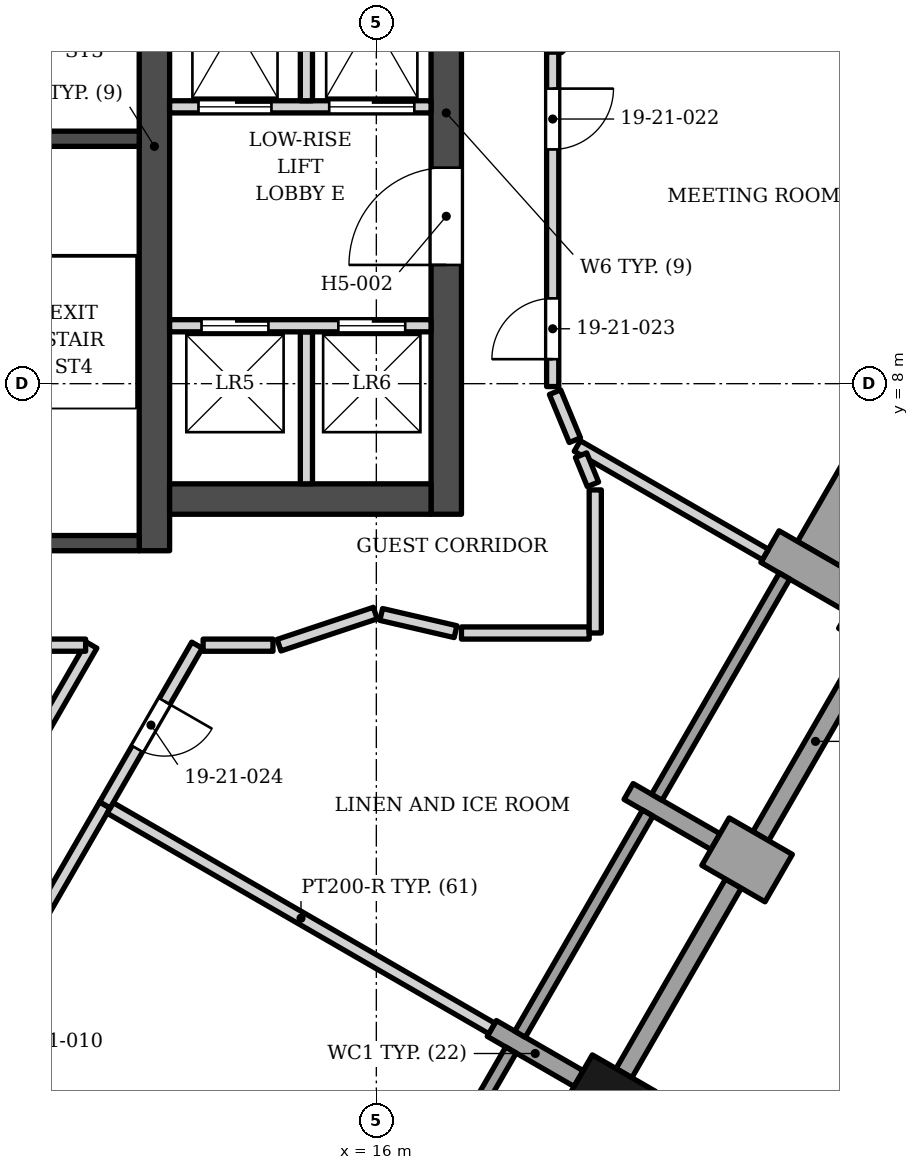
"""IFC4 building model, lengths in metres.
Left out: names, types, materials, properties, quantities, classifications, styles, units other than length and angle.
Written with IfcOpenShell. Run it as: python <this file> out.ifc"""

import sys

from ifc_helpers import new_model, si_unit, direction, frame, frame_2d, origin, origin_2d, place, context, subcontext, project, spatial, polyline, rectangle, outline, extrude, element, fill, save


model = new_model("IFC4")
c1 = context("Model", 3, precision=1e-05, world=origin(), true_north=direction((0.0, 1.0)))
c2 = subcontext(c1, "Body", "Model", "MODEL_VIEW")
j1 = project(units=[si_unit("LENGTHUNIT", "METRE"), si_unit("PLANEANGLEUNIT", "RADIAN")], contexts=[c1])
p1 = place(None, origin())
s1 = spatial("IfcSite", under=j1, at=p1, CompositionType="ELEMENT")
p2 = place(p1, origin())
s2 = spatial("IfcBuilding", under=s1, at=p2, CompositionType="ELEMENT")
p3 = place(p2, frame((0.0, 0.0, 91.8)))
s3 = spatial("IfcBuildingStorey", under=s2, at=p3, CompositionType="ELEMENT", Elevation=91.8)
p4 = place(p3, frame((12.35, 5.253, 0.0), z_axis=(0.0, 0.0, 1.0), x_axis=(0.0, 1.0, 0.0)))
e1 = element("IfcWall", 1, at=p4, inside=s3, PredefinedType="SHEAR", context=c2, shape_type="SweptSolid", body=[
    extrude(rectangle(XDim=13.3, YDim=0.5, at=frame_2d((6.65, 0.0))), origin(), (0.0, 0.0, 1.0), 3.4),
])
for number, where, z_axis, x_axis in (
    (2, (8.35, 12.028, 0.0), (0.0, 0.0, 1.0), (1.0, 0.0, 0.0)),
    (3, (8.35, 5.378, 0.0), (0.0, 0.0, 1.0), (1.0, 0.0, 0.0)),
):
    element("IfcWall", number, at=place(p3, frame(where, z_axis=z_axis, x_axis=x_axis)), inside=s3, PredefinedType="SHEAR", context=c2, shape_type="SweptSolid", body=[
        extrude(rectangle(XDim=3.75, YDim=0.25, at=frame_2d((1.875, 0.0))), origin(), (0.0, 0.0, 1.0), 3.4),
    ])
p5 = place(p3, frame((12.6, 6.103, 0.0), z_axis=(0.0, 0.0, 1.0), x_axis=(1.0, 0.0, 0.0)))
e4 = element("IfcWall", 4, at=p5, inside=s3, PredefinedType="SHEAR", context=c2, shape_type="SweptSolid", body=[
    extrude(rectangle(XDim=4.3, YDim=0.5, at=frame_2d((2.15, 0.0))), origin(), (0.0, 0.0, 1.0), 3.4),
])
p6 = place(p3, frame((17.15, 5.853, 0.0), z_axis=(0.0, 0.0, 1.0), x_axis=(0.0, 1.0, 0.0)))
e5 = element("IfcWall", 5, at=p6, inside=s3, PredefinedType="SHEAR", context=c2, shape_type="SweptSolid", body=[
    extrude(rectangle(XDim=13.2, YDim=0.5, at=frame_2d((6.6, 0.0))), origin(), (0.0, 0.0, 1.0), 3.4),
])
p7 = place(p6, frame((4.1, 0.0, 0.0)))
e6 = element("IfcOpeningElement", 6, at=p7, cuts=e5, PredefinedType="OPENING", context=c2, shape_type="SweptSolid", body=[
    extrude(rectangle(XDim=1.6, YDim=2.1, at=frame_2d((0.8, 1.05))), frame((0.0, 0.26, 0.0), z_axis=(0.0, -1.0, 0.0), x_axis=(1.0, 0.0, 0.0)), (0.0, 0.0, 1.0), 0.52),
])
p8 = place(p6, frame((10.15, 0.0, 0.0)))
e7 = element("IfcOpeningElement", 7, at=p8, cuts=e5, PredefinedType="OPENING", context=c2, shape_type="SweptSolid", body=[
    extrude(rectangle(XDim=0.9, YDim=2.1, at=frame_2d((0.45, 1.05))), frame((0.0, 0.26, 0.0), z_axis=(0.0, -1.0, 0.0), x_axis=(1.0, 0.0, 0.0)), (0.0, 0.0, 1.0), 0.52),
])
for number, where, z_axis, x_axis in (
    (8, (19.847, -3.728, 0.0), (0.0, 0.0, 1.0), (0.5, 0.866, 0.0)),
    (9, (24.347, 4.066, 0.0), (0.0, 0.0, 1.0), (0.5, 0.866, 0.0)),
):
    element("IfcColumn", number, at=place(p3, frame(where, z_axis=z_axis, x_axis=x_axis)), inside=s3, PredefinedType="COLUMN", context=c2, shape_type="SweptSolid", body=[
        extrude(rectangle(XDim=0.9, YDim=1.2, at=origin_2d()), origin(), (0.0, 0.0, 1.0), 3.4),
    ])
p9 = place(p3, frame((19.327, -3.428, 0.0), z_axis=(0.0, 0.0, 1.0), x_axis=(-0.866030301974, 0.499991515992, 0.0)))
e10 = element("IfcWall", 10, at=p9, inside=s3, PredefinedType="SOLIDWALL", context=c2, shape_type="SweptSolid", body=[
    extrude(rectangle(XDim=1.649, YDim=0.3, at=frame_2d((0.825, 0.0))), origin(), (0.0, 0.0, 1.0), 2.65),
])
p10 = place(p3, frame((21.578, 0.469, 0.0), z_axis=(0.0, 0.0, 1.0), x_axis=(0.866094119867, -0.499880961361, 0.0)))
e11 = element("IfcWall", 11, at=p10, inside=s3, PredefinedType="SOLIDWALL", context=c2, shape_type="SweptSolid", body=[
    extrude(rectangle(XDim=1.2, YDim=0.9, at=frame_2d((0.6, 0.0))), origin(), (0.0, 0.0, 1.0), 2.63),
])
p11 = place(p3, frame((21.578, 0.469, 0.0), z_axis=(0.0, 0.0, 1.0), x_axis=(-0.866040211805, 0.499974350878, 0.0)))
e12 = element("IfcWall", 12, at=p11, inside=s3, PredefinedType="SOLIDWALL", context=c2, shape_type="SweptSolid", body=[
    extrude(rectangle(XDim=1.65, YDim=0.3, at=frame_2d((0.825, 0.0))), origin(), (0.0, 0.0, 1.0), 2.65),
])
p12 = place(p3, frame((22.474, 5.321, 0.0), z_axis=(0.0, 0.0, 1.0), x_axis=(0.866040211805, -0.499974350878, 0.0)))
e13 = element("IfcWall", 13, at=p12, inside=s3, PredefinedType="SOLIDWALL", context=c2, shape_type="SweptSolid", body=[
    extrude(rectangle(XDim=1.65, YDim=0.6, at=frame_2d((0.825, 0.0))), origin(), (0.0, 0.0, 1.0), 2.45),
])
p13 = place(p3, frame((16.114, -6.595, 0.0), z_axis=(0.0, 0.0, 1.0), x_axis=(0.500027713859, 0.866009402589, 0.0)))
e14 = element("IfcWall", 14, at=p13, inside=s3, PredefinedType="ELEMENTEDWALL", context=c2, shape_type="SweptSolid", body=[
    extrude(rectangle(XDim=4.2, YDim=0.2, at=frame_2d((2.1, 0.0))), origin(), (0.0, 0.0, 1.0), 2.65),
])
p14 = place(p3, frame((20.073, -3.339, 0.0), z_axis=(0.0, 0.0, 1.0), x_axis=(0.500012057535, 0.866018442252, 0.0)))
e15 = element("IfcWall", 15, at=p14, inside=s3, PredefinedType="SOLIDWALL", context=c2, shape_type="SweptSolid", body=[
    extrude(rectangle(XDim=3.6, YDim=0.3, at=frame_2d((1.8, 0.0))), origin(), (0.0, 0.0, 1.0), 2.63),
])
p15 = place(p3, frame((18.364, -2.698, 0.0), z_axis=(0.0, 0.0, 1.0), x_axis=(0.500002543286, 0.866023935413, 0.0)))
e16 = element("IfcWall", 16, at=p15, inside=s3, PredefinedType="ELEMENTEDWALL", context=c2, shape_type="SweptSolid", body=[
    extrude(rectangle(XDim=4.2, YDim=0.2, at=frame_2d((2.1, 0.0))), origin(), (0.0, 0.0, 1.0), 2.65),
])
p16 = place(p3, frame((22.323, 0.559, 0.0), z_axis=(0.0, 0.0, 1.0), x_axis=(0.500012057535, 0.866018442252, 0.0)))
e17 = element("IfcWall", 17, at=p16, inside=s3, PredefinedType="SOLIDWALL", context=c2, shape_type="SweptSolid", body=[
    extrude(rectangle(XDim=3.6, YDim=0.3, at=frame_2d((1.8, 0.0))), origin(), (0.0, 0.0, 1.0), 2.63),
])
p17 = place(p3, frame((20.614, 1.199, 0.0), z_axis=(0.0, 0.0, 1.0), x_axis=(0.500027713859, 0.866009402589, 0.0)))
e18 = element("IfcWall", 18, at=p17, inside=s3, PredefinedType="ELEMENTEDWALL", context=c2, shape_type="SweptSolid", body=[
    extrude(rectangle(XDim=4.2, YDim=0.2, at=frame_2d((2.1, 0.0))), origin(), (0.0, 0.0, 1.0), 2.45),
])
p18 = place(p3, origin())
e19 = element("IfcWall", 19, at=p18, inside=s3, PredefinedType="SOLIDWALL", context=c2, shape_type="SweptSolid", body=[
    extrude(outline(polyline([(22.927, 5.406), (25.092, 4.156), (26.52, 6.628), (24.354, 7.878), (22.927, 5.406)])), origin(), (0.0, 0.0, 1.0), 2.63),
])
p19 = place(p3, frame((14.85, 6.353, 0.0), z_axis=(0.0, 0.0, 1.0), x_axis=(0.0, 1.0, 0.0)))
e20 = element("IfcWall", 20, at=p19, inside=s3, PredefinedType="SOLIDWALL", context=c2, shape_type="SweptSolid", body=[
    extrude(rectangle(XDim=2.5, YDim=0.2, at=frame_2d((1.25, 0.0))), origin(), (0.0, 0.0, 1.0), 3.23),
])
p20 = place(p3, frame((12.6, 8.953, 0.0), z_axis=(0.0, 0.0, 1.0), x_axis=(1.0, 0.0, 0.0)))
e21 = element("IfcWall", 21, at=p20, inside=s3, PredefinedType="SOLIDWALL", context=c2, shape_type="SweptSolid", body=[
    extrude(rectangle(XDim=4.3, YDim=0.2, at=frame_2d((2.15, 0.0))), origin(), (0.0, 0.0, 1.0), 3.23),
])
p21 = place(p20, frame((0.525, 0.0, 0.0)))
e22 = element("IfcOpeningElement", 22, at=p21, cuts=e21, PredefinedType="OPENING", context=c2, shape_type="SweptSolid", body=[
    extrude(rectangle(XDim=1.1, YDim=2.1, at=frame_2d((0.55, 1.05))), frame((0.0, 0.11, 0.0), z_axis=(0.0, -1.0, 0.0), x_axis=(1.0, 0.0, 0.0)), (0.0, 0.0, 1.0), 0.22),
])
p22 = place(p20, frame((2.775, 0.0, 0.0)))
e23 = element("IfcOpeningElement", 23, at=p22, cuts=e21, PredefinedType="OPENING", context=c2, shape_type="SweptSolid", body=[
    extrude(rectangle(XDim=1.1, YDim=2.1, at=frame_2d((0.55, 1.05))), frame((0.0, 0.11, 0.0), z_axis=(0.0, -1.0, 0.0), x_axis=(1.0, 0.0, 0.0)), (0.0, 0.0, 1.0), 0.22),
])
p23 = place(p3, frame((12.6, 12.552, 0.0), z_axis=(0.0, 0.0, 1.0), x_axis=(1.0, 0.0, 0.0)))
e24 = element("IfcWall", 24, at=p23, inside=s3, PredefinedType="SOLIDWALL", context=c2, shape_type="SweptSolid", body=[
    extrude(rectangle(XDim=4.3, YDim=0.2, at=frame_2d((2.15, 0.0))), origin(), (0.0, 0.0, 1.0), 3.23),
])
p24 = place(p23, frame((0.475, 0.0, 0.0)))
e25 = element("IfcOpeningElement", 25, at=p24, cuts=e24, PredefinedType="OPENING", context=c2, shape_type="SweptSolid", body=[
    extrude(rectangle(XDim=1.2, YDim=2.1, at=frame_2d((0.6, 1.05))), frame((0.0, 0.11, 0.0), z_axis=(0.0, -1.0, 0.0), x_axis=(1.0, 0.0, 0.0)), (0.0, 0.0, 1.0), 0.22),
])
p25 = place(p23, frame((2.625, 0.0, 0.0)))
e26 = element("IfcOpeningElement", 26, at=p25, cuts=e24, PredefinedType="OPENING", context=c2, shape_type="SweptSolid", body=[
    extrude(rectangle(XDim=1.4, YDim=2.1, at=frame_2d((0.7, 1.05))), frame((0.0, 0.11, 0.0), z_axis=(0.0, -1.0, 0.0), x_axis=(1.0, 0.0, 0.0)), (0.0, 0.0, 1.0), 0.22),
])
p26 = place(p3, frame((14.85, 12.653, 0.0), z_axis=(0.0, 0.0, 1.0), x_axis=(0.0, 1.0, 0.0)))
e27 = element("IfcWall", 27, at=p26, inside=s3, PredefinedType="SOLIDWALL", context=c2, shape_type="SweptSolid", body=[
    extrude(rectangle(XDim=3.0, YDim=0.2, at=frame_2d((1.5, 0.0))), origin(), (0.0, 0.0, 1.0), 3.23),
])
p27 = place(p3, frame((3.379, -10.049, 0.0), z_axis=(0.0, 0.0, 1.0), x_axis=(0.50000242408, 0.866024004237, 0.0)))
e28 = element("IfcWall", 28, at=p27, inside=s3, PredefinedType="PARTITIONING", context=c2, shape_type="SweptSolid", body=[
    extrude(rectangle(XDim=15.877, YDim=0.2, at=frame_2d((7.938, 0.0))), origin(), (0.0, 0.0, 1.0), 2.384),
])
p28 = place(p27, frame((9.359, 0.0, 0.0)))
e29 = element("IfcOpeningElement", 29, at=p28, cuts=e28, PredefinedType="OPENING", context=c2, shape_type="SweptSolid", body=[
    extrude(rectangle(XDim=1.0, YDim=2.1, at=frame_2d((0.5, 1.05))), frame((0.0, 0.11, 0.0), z_axis=(0.0, -1.0, 0.0), x_axis=(1.0, 0.0, 0.0)), (0.0, 0.0, 1.0), 0.22),
])
p29 = place(p3, frame((6.985, -6.807, 0.0), z_axis=(0.0, 0.0, 1.0), x_axis=(0.500170742348, 0.865926803199, 0.0)))
e30 = element("IfcWall", 30, at=p29, inside=s3, PredefinedType="PARTITIONING", context=c2, shape_type="SweptSolid", body=[
    extrude(rectangle(XDim=9.098, YDim=0.2, at=frame_2d((4.549, 0.0))), origin(), (0.0, 0.0, 1.0), 2.552),
])
p30 = place(p29, frame((4.098, 0.0, 0.0)))
e31 = element("IfcOpeningElement", 31, at=p30, cuts=e30, PredefinedType="OPENING", context=c2, shape_type="SweptSolid", body=[
    extrude(rectangle(XDim=1.0, YDim=2.1, at=frame_2d((0.5, 1.05))), frame((0.0, 0.11, 0.0), z_axis=(0.0, -1.0, 0.0), x_axis=(1.0, 0.0, 0.0)), (0.0, 0.0, 1.0), 0.22),
])
p31 = place(p3, frame((11.623, 1.022, 0.0), z_axis=(0.0, 0.0, 1.0), x_axis=(0.865930886033, -0.500163673825, 0.0)))
e32 = element("IfcWall", 32, at=p31, inside=s3, PredefinedType="PARTITIONING", context=c2, shape_type="SweptSolid", body=[
    extrude(rectangle(XDim=7.248, YDim=0.2, at=frame_2d((3.624, 0.0))), origin(), (0.0, 0.0, 1.0), 2.384),
])
p32 = place(p3, frame((6.0, 3.7, 0.0), z_axis=(0.0, 0.0, 1.0), x_axis=(1.0, 0.0, 0.0)))
e33 = element("IfcWall", 33, at=p32, inside=s3, PredefinedType="PARTITIONING", context=c2, shape_type="SweptSolid", body=[
    extrude(rectangle(XDim=5.219, YDim=0.2, at=frame_2d((2.609, 0.0))), origin(), (0.0, 0.0, 1.0), 2.832),
])
p33 = place(p3, frame((11.536, 1.073, 0.0), z_axis=(0.0, 0.0, 1.0), x_axis=(0.499620231516, 0.866244552225, 0.0)))
e34 = element("IfcWall", 34, at=p33, inside=s3, PredefinedType="PARTITIONING", context=c2, shape_type="SweptSolid", body=[
    extrude(rectangle(XDim=3.032, YDim=0.2, at=frame_2d((1.516, 0.0))), origin(), (0.0, 0.0, 1.0), 3.23),
])
p34 = place(p33, frame((1.066, 0.0, 0.0)))
e35 = element("IfcOpeningElement", 35, at=p34, cuts=e34, PredefinedType="OPENING", context=c2, shape_type="SweptSolid", body=[
    extrude(rectangle(XDim=0.9, YDim=2.1, at=frame_2d((0.45, 1.05))), frame((0.0, 0.11, 0.0), z_axis=(0.0, -1.0, 0.0), x_axis=(1.0, 0.0, 0.0)), (0.0, 0.0, 1.0), 0.22),
])
p35 = place(p3, frame((13.151, 3.699, 0.0), z_axis=(0.0, 0.0, 1.0), x_axis=(1.0, 0.0, 0.0)))
e36 = element("IfcWall", 36, at=p35, inside=s3, PredefinedType="PARTITIONING", context=c2, shape_type="SweptSolid", body=[
    extrude(rectangle(XDim=1.149, YDim=0.2, at=frame_2d((0.574, 0.0))), origin(), (0.0, 0.0, 1.0), 2.384),
])
p36 = place(p3, frame((17.4, 3.899, 0.0), z_axis=(0.0, 0.0, 1.0), x_axis=(0.999999993244, 0.000116238521, 0.0)))
e37 = element("IfcWall", 37, at=p36, inside=s3, PredefinedType="PARTITIONING", context=c2, shape_type="SweptSolid", body=[
    extrude(rectangle(XDim=2.1, YDim=0.2, at=frame_2d((1.05, 0.0))), origin(), (0.0, 0.0, 1.0), 3.23),
])
p37 = place(p3, frame((16.08, 4.205, 0.0), z_axis=(0.0, 0.0, 1.0), x_axis=(0.974315694548, -0.225186428005, 0.0)))
e38 = element("IfcWall", 38, at=p37, inside=s3, PredefinedType="PARTITIONING", context=c2, shape_type="SweptSolid", body=[
    extrude(rectangle(XDim=1.254, YDim=0.2, at=frame_2d((0.627, 0.0))), origin(), (0.0, 0.0, 1.0), 3.23),
])
p38 = place(p3, frame((14.4, 3.699, 0.0), z_axis=(0.0, 0.0, 1.0), x_axis=(0.948683298051, 0.316227766017, 0.0)))
e39 = element("IfcWall", 39, at=p38, inside=s3, PredefinedType="PARTITIONING", context=c2, shape_type="SweptSolid", body=[
    extrude(rectangle(XDim=1.668, YDim=0.2, at=frame_2d((0.834, 0.0))), origin(), (0.0, 0.0, 1.0), 3.23),
])
p39 = place(p3, frame((19.305, 6.975, 0.0), z_axis=(0.0, 0.0, 1.0), x_axis=(0.866254994177, -0.499602126761, 0.0)))
e40 = element("IfcWall", 40, at=p39, inside=s3, PredefinedType="PARTITIONING", context=c2, shape_type="SweptSolid", body=[
    extrude(rectangle(XDim=3.572, YDim=0.2, at=frame_2d((1.786, 0.0))), origin(), (0.0, 0.0, 1.0), 2.552),
])
p40 = place(p3, frame((19.6, 3.9, 0.0), z_axis=(0.0, 0.0, 1.0), x_axis=(0.000103755965, 0.999999994617, 0.0)))
e41 = element("IfcWall", 41, at=p40, inside=s3, PredefinedType="PARTITIONING", context=c2, shape_type="SweptSolid", body=[
    extrude(rectangle(XDim=2.353, YDim=0.2, at=frame_2d((1.177, 0.0))), origin(), (0.0, 0.0, 1.0), 2.45),
])
p41 = place(p3, frame((19.366, 6.824, 0.0), z_axis=(0.0, 0.0, 1.0), x_axis=(0.378945204734, -0.925419111435, 0.0)))
e42 = element("IfcWall", 42, at=p41, inside=s3, PredefinedType="PARTITIONING", context=c2, shape_type="SweptSolid", body=[
    extrude(rectangle(XDim=0.517, YDim=0.2, at=frame_2d((0.259, 0.0))), origin(), (0.0, 0.0, 1.0), 3.23),
])
p42 = place(p3, frame((18.939, 7.86, 0.0), z_axis=(0.0, 0.0, 1.0), x_axis=(0.382057312896, -0.924138631193, 0.0)))
e43 = element("IfcWall", 43, at=p42, inside=s3, PredefinedType="PARTITIONING", context=c2, shape_type="SweptSolid", body=[
    extrude(rectangle(XDim=0.854, YDim=0.2, at=frame_2d((0.427, 0.0))), origin(), (0.0, 0.0, 1.0), 3.23),
])
p43 = place(p3, frame((18.9, 7.953, 0.0), z_axis=(0.0, 0.0, 1.0), x_axis=(0.0, 1.0, 0.0)))
e44 = element("IfcWall", 44, at=p43, inside=s3, PredefinedType="PARTITIONING", context=c2, shape_type="SweptSolid", body=[
    extrude(rectangle(XDim=5.5, YDim=0.2, at=frame_2d((2.75, 0.0))), origin(), (0.0, 0.0, 1.0), 3.23),
])
p44 = place(p43, frame((3.899, 0.0, 0.0)))
e45 = element("IfcOpeningElement", 45, at=p44, cuts=e44, PredefinedType="OPENING", context=c2, shape_type="SweptSolid", body=[
    extrude(rectangle(XDim=1.0, YDim=2.1, at=frame_2d((0.5, 1.05))), frame((0.0, 0.11, 0.0), z_axis=(0.0, -1.0, 0.0), x_axis=(1.0, 0.0, 0.0)), (0.0, 0.0, 1.0), 0.22),
])
p45 = place(p43, frame((0.45, 0.0, 0.0)))
e46 = element("IfcOpeningElement", 46, at=p45, cuts=e44, PredefinedType="OPENING", context=c2, shape_type="SweptSolid", body=[
    extrude(rectangle(XDim=1.0, YDim=2.1, at=frame_2d((0.5, 1.05))), frame((0.0, 0.11, 0.0), z_axis=(0.0, -1.0, 0.0), x_axis=(1.0, 0.0, 0.0)), (0.0, 0.0, 1.0), 0.22),
])
p46 = place(p3, frame((18.976, 13.519, 0.0), z_axis=(0.0, 0.0, 1.0), x_axis=(0.749825828818, 0.661635266924, 0.0)))
e47 = element("IfcWall", 47, at=p46, inside=s3, PredefinedType="PARTITIONING", context=c2, shape_type="SweptSolid", body=[
    extrude(rectangle(XDim=2.37, YDim=0.2, at=frame_2d((1.185, 0.0))), origin(), (0.0, 0.0, 1.0), 3.23),
])
p47 = place(p21, origin())
e48 = element("IfcDoor", 48, at=p47, inside=s3, OperationType="DOUBLE_DOOR_SLIDING", PredefinedType="DOOR", context=c2, shape_type="SweptSolid", body=[
    extrude(rectangle(XDim=1.1, YDim=2.1, at=frame_2d((0.55, 1.05))), frame((0.0, 0.025, 0.0), z_axis=(0.0, -1.0, 0.0), x_axis=(1.0, 0.0, 0.0)), (0.0, 0.0, 1.0), 0.05),
])
fill(e22, e48)
p48 = place(p22, origin())
e49 = element("IfcDoor", 49, at=p48, inside=s3, OperationType="DOUBLE_DOOR_SLIDING", PredefinedType="DOOR", context=c2, shape_type="SweptSolid", body=[
    extrude(rectangle(XDim=1.1, YDim=2.1, at=frame_2d((0.55, 1.05))), frame((0.0, 0.025, 0.0), z_axis=(0.0, -1.0, 0.0), x_axis=(1.0, 0.0, 0.0)), (0.0, 0.0, 1.0), 0.05),
])
fill(e23, e49)
p49 = place(p24, origin())
e50 = element("IfcDoor", 50, at=p49, inside=s3, OperationType="DOUBLE_DOOR_SLIDING", PredefinedType="DOOR", context=c2, shape_type="SweptSolid", body=[
    extrude(rectangle(XDim=1.2, YDim=2.1, at=frame_2d((0.6, 1.05))), frame((0.0, 0.025, 0.0), z_axis=(0.0, -1.0, 0.0), x_axis=(1.0, 0.0, 0.0)), (0.0, 0.0, 1.0), 0.05),
])
fill(e25, e50)
p50 = place(p25, origin())
e51 = element("IfcDoor", 51, at=p50, inside=s3, OperationType="DOUBLE_DOOR_SLIDING", PredefinedType="DOOR", context=c2, shape_type="SweptSolid", body=[
    extrude(rectangle(XDim=1.4, YDim=2.1, at=frame_2d((0.7, 1.05))), frame((0.0, 0.025, 0.0), z_axis=(0.0, -1.0, 0.0), x_axis=(1.0, 0.0, 0.0)), (0.0, 0.0, 1.0), 0.05),
])
fill(e26, e51)
p51 = place(p7, origin())
e52 = element("IfcDoor", 52, at=p51, inside=s3, OperationType="DOUBLE_DOOR_SINGLE_SWING", PredefinedType="DOOR", context=c2, shape_type="SweptSolid", body=[
    extrude(rectangle(XDim=1.6, YDim=2.1, at=frame_2d((0.8, 1.05))), frame((0.0, 0.025, 0.0), z_axis=(0.0, -1.0, 0.0), x_axis=(1.0, 0.0, 0.0)), (0.0, 0.0, 1.0), 0.05),
])
fill(e6, e52)
p52 = place(p44, origin())
e53 = element("IfcDoor", 53, at=p52, inside=s3, OperationType="SINGLE_SWING_RIGHT", PredefinedType="DOOR", context=c2, shape_type="SweptSolid", body=[
    extrude(rectangle(XDim=1.0, YDim=2.1, at=frame_2d((0.5, 1.05))), frame((0.0, 0.025, 0.0), z_axis=(0.0, -1.0, 0.0), x_axis=(1.0, 0.0, 0.0)), (0.0, 0.0, 1.0), 0.05),
])
fill(e45, e53)
p53 = place(p45, origin())
e54 = element("IfcDoor", 54, at=p53, inside=s3, OperationType="SINGLE_SWING_LEFT", PredefinedType="DOOR", context=c2, shape_type="SweptSolid", body=[
    extrude(rectangle(XDim=1.0, YDim=2.1, at=frame_2d((0.5, 1.05))), frame((0.0, 0.025, 0.0), z_axis=(0.0, -1.0, 0.0), x_axis=(1.0, 0.0, 0.0)), (0.0, 0.0, 1.0), 0.05),
])
fill(e46, e54)
p54 = place(p34, origin())
e55 = element("IfcDoor", 55, at=p54, inside=s3, OperationType="SINGLE_SWING_RIGHT", PredefinedType="DOOR", context=c2, shape_type="SweptSolid", body=[
    extrude(rectangle(XDim=0.9, YDim=2.1, at=frame_2d((0.45, 1.05))), frame((0.0, 0.025, 0.0), z_axis=(0.0, -1.0, 0.0), x_axis=(1.0, 0.0, 0.0)), (0.0, 0.0, 1.0), 0.05),
])
fill(e35, e55)
save(model, sys.argv[1])
